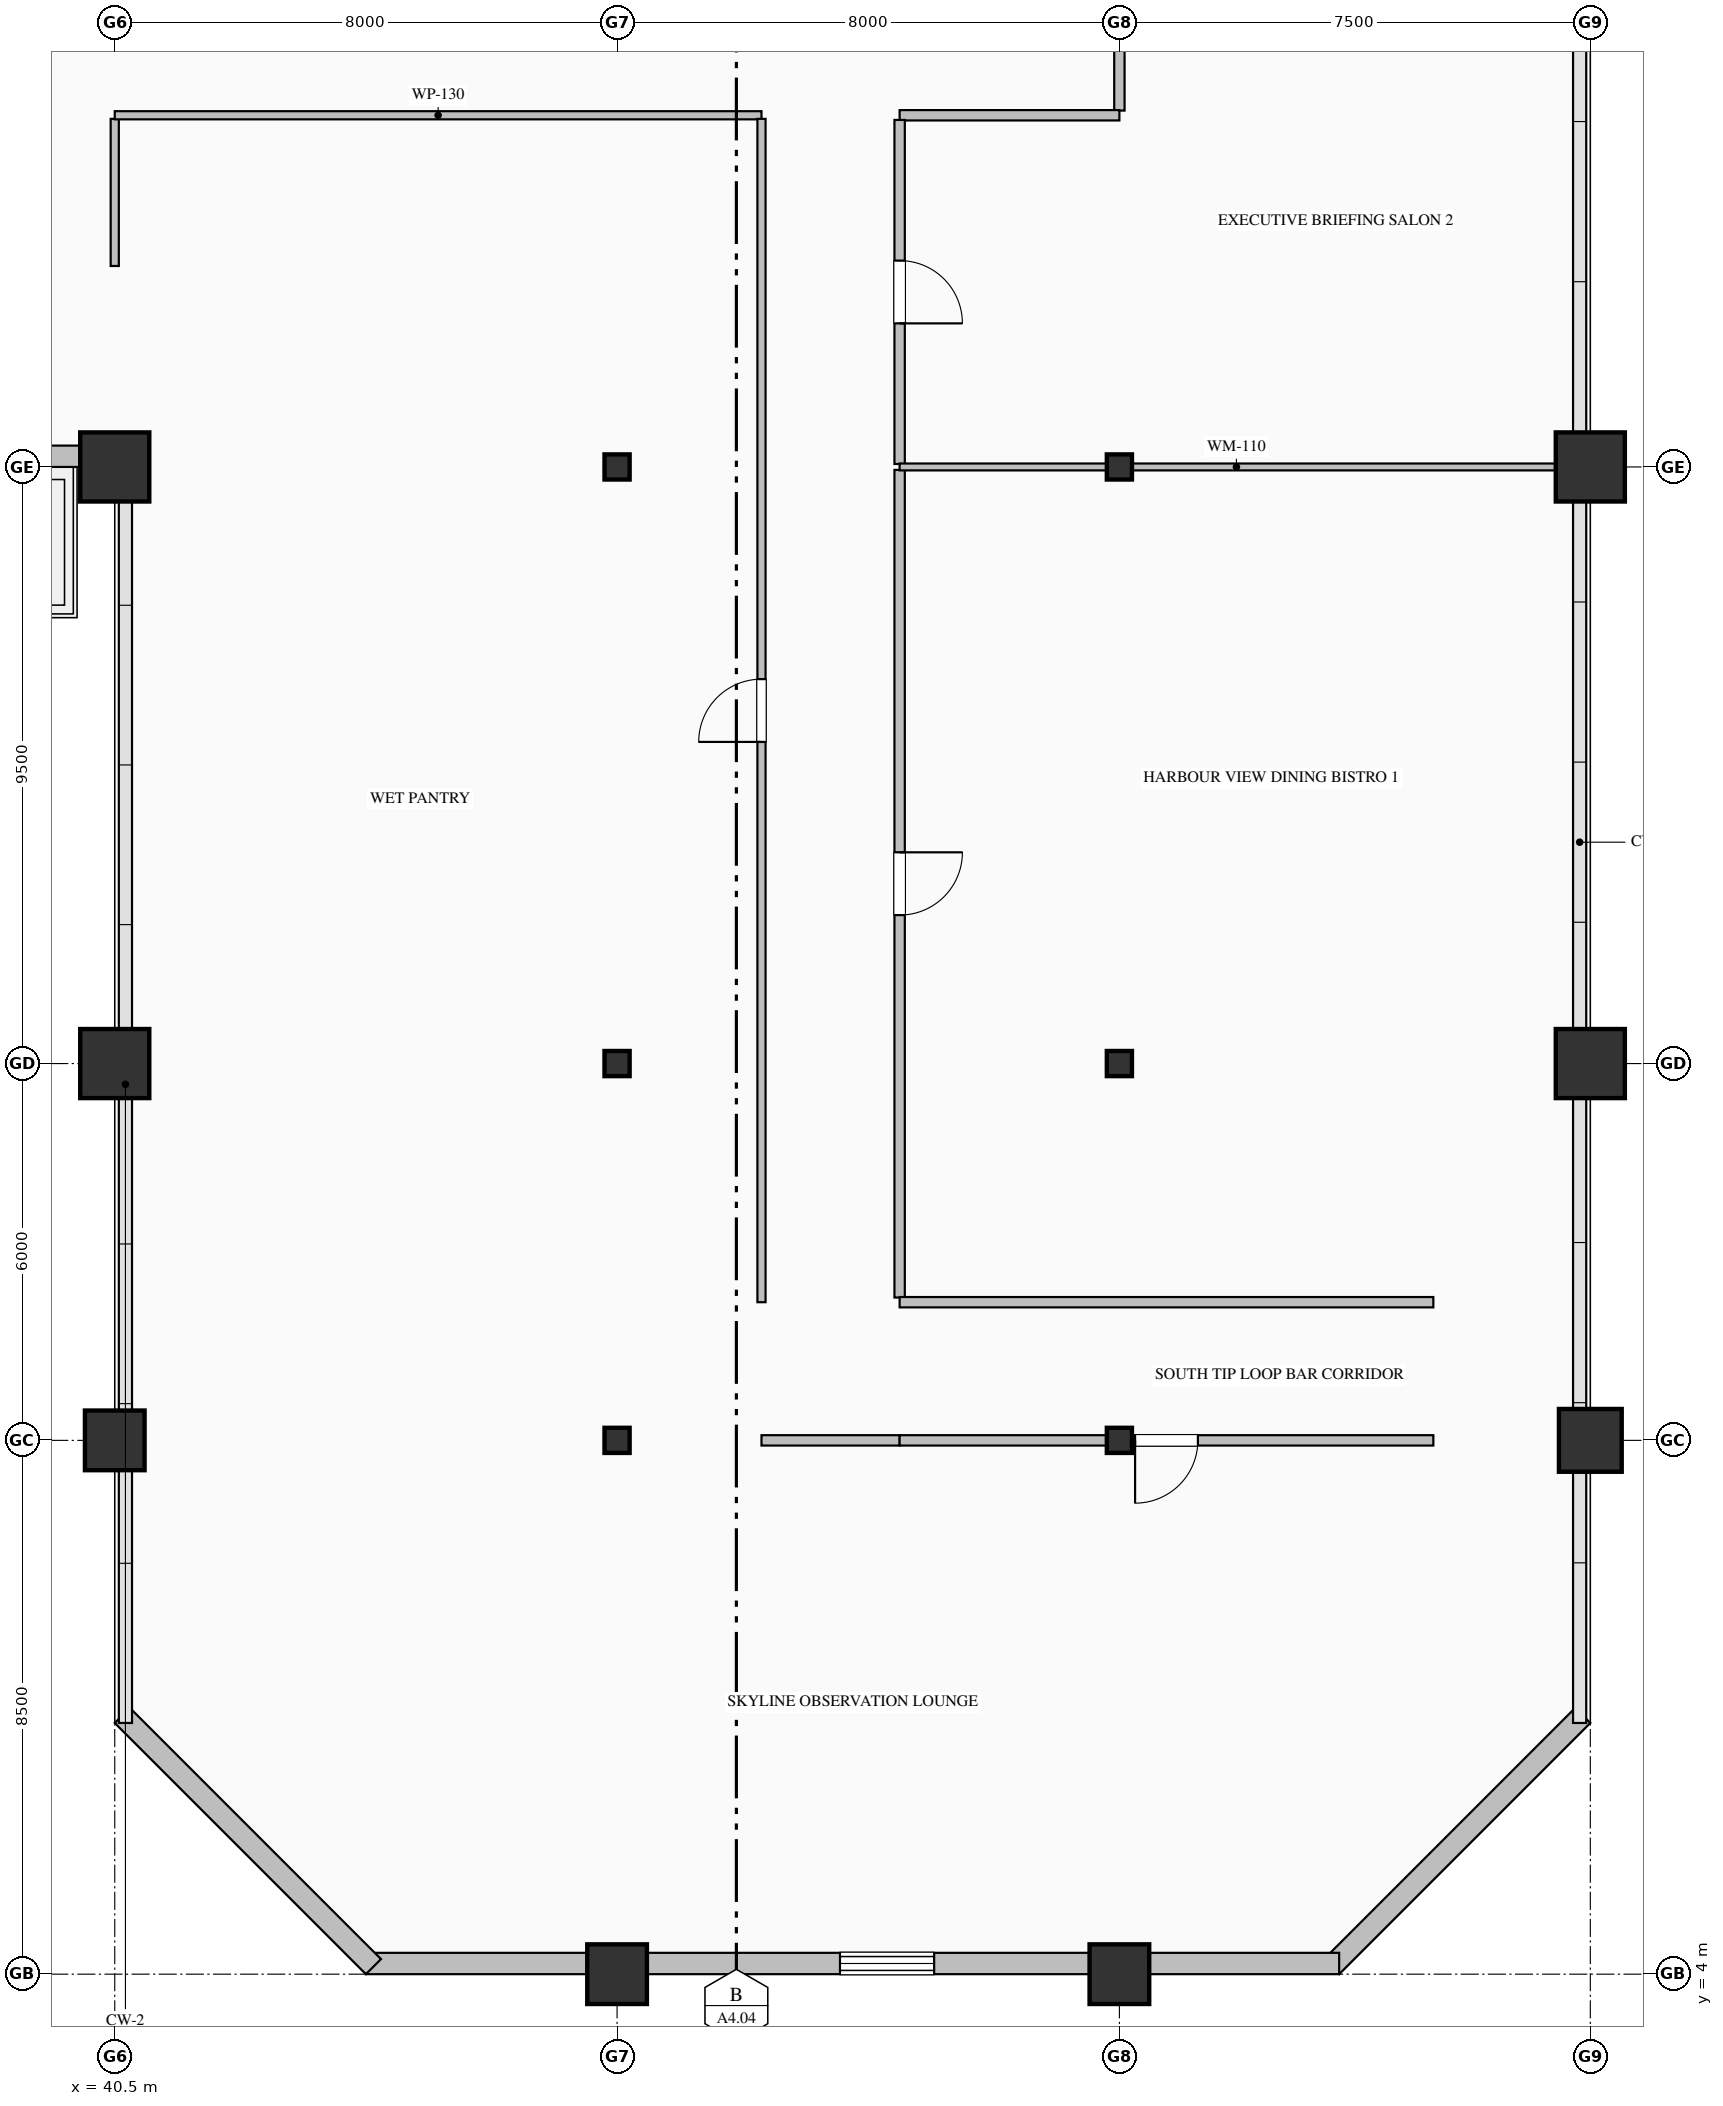
"""IFC4 building model, lengths in metres.
Left out: names, types, materials, properties, quantities, classifications, styles, units other than length and angle.
Written with IfcOpenShell. Run it as: python <this file> out.ifc"""

import sys

from ifc_helpers import new_model, si_unit, direction, frame, frame_2d, origin, origin_2d, place, context, subcontext, project, spatial, rectangle, hollow_rectangle, hollow_circle, i_section, extrude, element, fill, save


model = new_model("IFC4")
c1 = context("Model", 3, precision=1e-05, world=origin(), true_north=direction((0.0, 1.0)))
c2 = subcontext(c1, "Body", "Model", "MODEL_VIEW")
j1 = project(units=[si_unit("LENGTHUNIT", "METRE"), si_unit("PLANEANGLEUNIT", "RADIAN")], contexts=[c1])
p1 = place(None, origin())
s1 = spatial("IfcSite", under=j1, at=p1, CompositionType="ELEMENT")
p2 = place(p1, origin())
s2 = spatial("IfcBuilding", under=s1, at=p2, CompositionType="ELEMENT")
p3 = place(p2, frame((0.0, 0.0, 113.6)))
s3 = spatial("IfcBuildingStorey", under=s2, at=p3, CompositionType="ELEMENT", Elevation=113.6)
p4 = place(p3, frame((40.5, 12.5, 0.0), z_axis=(0.0, 0.0, 1.0), x_axis=(1.0, 0.0, 0.0)))
e1 = element("IfcColumn", 1, at=p4, inside=s3, PredefinedType="COLUMN", context=c2, shape_type="SweptSolid", body=[
    extrude(hollow_rectangle(XDim=0.95, YDim=0.95, WallThickness=0.036, at=origin_2d()), origin(), (0.0, 0.0, 1.0), 5.4),
])
for number, where, z_axis, x_axis in (
    (2, (40.5, 18.5, 0.0), (0.0, 0.0, 1.0), (1.0, 0.0, 0.0)),
    (3, (40.5, 28.0, 0.0), (0.0, 0.0, 1.0), (1.0, 0.0, 0.0)),
):
    element("IfcColumn", number, at=place(p3, frame(where, z_axis=z_axis, x_axis=x_axis)), inside=s3, PredefinedType="COLUMN", context=c2, shape_type="SweptSolid", body=[
        extrude(hollow_rectangle(XDim=1.1, YDim=1.1, WallThickness=0.04, at=origin_2d()), origin(), (0.0, 0.0, 1.0), 5.4),
    ])
p5 = place(p3, frame((48.5, 4.0, 0.0), z_axis=(0.0, 0.0, 1.0), x_axis=(1.0, 0.0, 0.0)))
e4 = element("IfcColumn", 4, at=p5, inside=s3, PredefinedType="COLUMN", context=c2, shape_type="SweptSolid", body=[
    extrude(hollow_rectangle(XDim=0.95, YDim=0.95, WallThickness=0.036, at=origin_2d()), origin(), (0.0, 0.0, 1.0), 5.4),
])
for number, where, z_axis, x_axis in (
    (5, (48.5, 12.5, 0.0), (0.0, 0.0, 1.0), (1.0, 0.0, 0.0)),
    (6, (48.5, 18.5, 0.0), (0.0, 0.0, 1.0), (1.0, 0.0, 0.0)),
    (7, (48.5, 28.0, 0.0), (0.0, 0.0, 1.0), (1.0, 0.0, 0.0)),
):
    element("IfcColumn", number, at=place(p3, frame(where, z_axis=z_axis, x_axis=x_axis)), inside=s3, PredefinedType="COLUMN", context=c2, shape_type="SweptSolid", body=[
        extrude(i_section(OverallWidth=0.4, OverallDepth=0.4, WebThickness=0.013, FlangeThickness=0.021, FilletRadius=0.022, at=origin_2d()), origin(), (0.0, 0.0, 1.0), 5.4),
    ])
p6 = place(p3, frame((56.5, 4.0, 0.0), z_axis=(0.0, 0.0, 1.0), x_axis=(1.0, 0.0, 0.0)))
e8 = element("IfcColumn", 8, at=p6, inside=s3, PredefinedType="COLUMN", context=c2, shape_type="SweptSolid", body=[
    extrude(hollow_rectangle(XDim=0.95, YDim=0.95, WallThickness=0.036, at=origin_2d()), origin(), (0.0, 0.0, 1.0), 5.4),
])
for number, where, z_axis, x_axis in (
    (9, (56.5, 12.5, 0.0), (0.0, 0.0, 1.0), (1.0, 0.0, 0.0)),
    (10, (56.5, 18.5, 0.0), (0.0, 0.0, 1.0), (1.0, 0.0, 0.0)),
    (11, (56.5, 28.0, 0.0), (0.0, 0.0, 1.0), (1.0, 0.0, 0.0)),
):
    element("IfcColumn", number, at=place(p3, frame(where, z_axis=z_axis, x_axis=x_axis)), inside=s3, PredefinedType="COLUMN", context=c2, shape_type="SweptSolid", body=[
        extrude(i_section(OverallWidth=0.4, OverallDepth=0.4, WebThickness=0.013, FlangeThickness=0.021, FilletRadius=0.022, at=origin_2d()), origin(), (0.0, 0.0, 1.0), 5.4),
    ])
p7 = place(p3, frame((64.0, 12.5, 0.0), z_axis=(0.0, 0.0, 1.0), x_axis=(1.0, 0.0, 0.0)))
e12 = element("IfcColumn", 12, at=p7, inside=s3, PredefinedType="COLUMN", context=c2, shape_type="SweptSolid", body=[
    extrude(hollow_circle(Radius=0.5, WallThickness=0.036, at=origin_2d()), origin(), (0.0, 0.0, 1.0), 5.4),
])
for number, where, z_axis, x_axis in (
    (13, (64.0, 18.5, 0.0), (0.0, 0.0, 1.0), (1.0, 0.0, 0.0)),
    (14, (64.0, 28.0, 0.0), (0.0, 0.0, 1.0), (1.0, 0.0, 0.0)),
):
    element("IfcColumn", number, at=place(p3, frame(where, z_axis=z_axis, x_axis=x_axis)), inside=s3, PredefinedType="COLUMN", context=c2, shape_type="SweptSolid", body=[
        extrude(hollow_rectangle(XDim=1.1, YDim=1.1, WallThickness=0.04, at=origin_2d()), origin(), (0.0, 0.0, 1.0), 5.4),
    ])
p8 = place(p3, frame((40.52, 28.17, 0.0), z_axis=(0.0, 0.0, 1.0), x_axis=(-1.0, 0.0, 0.0)))
e15 = element("IfcWall", 15, at=p8, inside=s3, PredefinedType="SOLIDWALL", context=c2, shape_type="SweptSolid", body=[
    extrude(rectangle(XDim=27.52, YDim=0.34, at=frame_2d((13.76, 0.0))), origin(), (0.0, 0.0, 1.0), 4.565),
])
p9 = place(p8, frame((17.1, 0.0, 0.65)))
e16 = element("IfcOpeningElement", 16, at=p9, cuts=e15, PredefinedType="OPENING", context=c2, shape_type="SweptSolid", body=[
    extrude(rectangle(XDim=1.8, YDim=2.55, at=frame_2d((0.9, 1.275))), frame((0.0, 0.18, 0.0), z_axis=(0.0, -1.0, 0.0), x_axis=(1.0, 0.0, 0.0)), (0.0, 0.0, 1.0), 0.36),
])
p10 = place(p8, frame((20.85, 0.0, 0.85)))
e17 = element("IfcOpeningElement", 17, at=p10, cuts=e15, PredefinedType="OPENING", context=c2, shape_type="SweptSolid", body=[
    extrude(rectangle(XDim=1.5, YDim=1.95, at=frame_2d((0.75, 0.975))), frame((0.0, 0.18, 0.0), z_axis=(0.0, -1.0, 0.0), x_axis=(1.0, 0.0, 0.0)), (0.0, 0.0, 1.0), 0.36),
])
p11 = place(p8, frame((11.395, 0.0, 0.0)))
e18 = element("IfcOpeningElement", 18, at=p11, cuts=e15, PredefinedType="OPENING", context=c2, shape_type="SweptSolid", body=[
    extrude(rectangle(XDim=1.25, YDim=2.25, at=frame_2d((0.625, 1.125))), frame((0.0, 0.18, 0.0), z_axis=(0.0, -1.0, 0.0), x_axis=(1.0, 0.0, 0.0)), (0.0, 0.0, 1.0), 0.36),
])
p12 = place(p3, frame((63.88, 8.12, 0.0), z_axis=(0.0, 0.0, 1.0), x_axis=(-0.707106781187, -0.707106781187, 0.0)))
e19 = element("IfcWall", 19, at=p12, inside=s3, PredefinedType="SOLIDWALL", context=c2, shape_type="SweptSolid", body=[
    extrude(rectangle(XDim=5.657, YDim=0.34, at=frame_2d((2.828, 0.0))), origin(), (0.0, 0.0, 1.0), 5.165),
])
p13 = place(p3, frame((60.0, 4.17, 0.0), z_axis=(0.0, 0.0, 1.0), x_axis=(-1.0, 0.0, 0.0)))
e20 = element("IfcWall", 20, at=p13, inside=s3, PredefinedType="SOLIDWALL", context=c2, shape_type="SweptSolid", body=[
    extrude(rectangle(XDim=15.5, YDim=0.34, at=frame_2d((7.75, 0.0))), origin(), (0.0, 0.0, 1.0), 4.665),
])
p14 = place(p13, frame((6.45, 0.0, 0.85)))
e21 = element("IfcOpeningElement", 21, at=p14, cuts=e20, PredefinedType="OPENING", context=c2, shape_type="SweptSolid", body=[
    extrude(rectangle(XDim=1.5, YDim=1.95, at=frame_2d((0.75, 0.975))), frame((0.0, 0.18, 0.0), z_axis=(0.0, -1.0, 0.0), x_axis=(1.0, 0.0, 0.0)), (0.0, 0.0, 1.0), 0.36),
])
p15 = place(p3, frame((44.62, 4.12, 0.0), z_axis=(0.0, 0.0, 1.0), x_axis=(-0.707106781187, 0.707106781187, 0.0)))
e22 = element("IfcWall", 22, at=p15, inside=s3, PredefinedType="SOLIDWALL", context=c2, shape_type="SweptSolid", body=[
    extrude(rectangle(XDim=5.657, YDim=0.34, at=frame_2d((2.828, 0.0))), origin(), (0.0, 0.0, 1.0), 5.165),
])
p16 = place(p3, frame((40.5, 33.543, 0.0), z_axis=(0.0, 0.0, 1.0), x_axis=(0.0, -1.0, 0.0)))
e23 = element("IfcWall", 23, at=p16, inside=s3, PredefinedType="PARTITIONING", context=c2, shape_type="SweptSolid", body=[
    extrude(rectangle(XDim=2.343, YDim=0.13, at=frame_2d((1.171, 0.0))), origin(), (0.0, 0.0, 1.0), 4.557),
])
p17 = place(p3, frame((56.5, 36.0, 0.0), z_axis=(0.0, 0.0, 1.0), x_axis=(0.0, -1.0, 0.0)))
e24 = element("IfcWall", 24, at=p17, inside=s3, PredefinedType="PARTITIONING", context=c2, shape_type="SweptSolid", body=[
    extrude(rectangle(XDim=2.325, YDim=0.165, at=frame_2d((1.163, 0.0))), origin(), (0.0, 0.0, 1.0), 4.557),
])
p18 = place(p3, frame((56.5, 33.6, 0.0), z_axis=(0.0, 0.0, 1.0), x_axis=(-1.0, 0.0, 0.0)))
e25 = element("IfcWall", 25, at=p18, inside=s3, PredefinedType="PARTITIONING", context=c2, shape_type="SweptSolid", body=[
    extrude(rectangle(XDim=3.5, YDim=0.165, at=frame_2d((1.75, 0.0))), origin(), (0.0, 0.0, 1.0), 5.165),
])
p19 = place(p3, frame((50.8, 33.6, 0.0), z_axis=(0.0, 0.0, 1.0), x_axis=(-1.0, 0.0, 0.0)))
e26 = element("IfcWall", 26, at=p19, inside=s3, PredefinedType="PARTITIONING", context=c2, shape_type="SweptSolid", body=[
    extrude(rectangle(XDim=10.3, YDim=0.13, at=frame_2d((5.15, 0.0))), origin(), (0.0, 0.0, 1.0), 5.165),
])
p20 = place(p3, frame((53.0, 27.953, 0.0), z_axis=(0.0, 0.0, 1.0), x_axis=(0.0, -1.0, 0.0)))
e27 = element("IfcWall", 27, at=p20, inside=s3, PredefinedType="PARTITIONING", context=c2, shape_type="SweptSolid", body=[
    extrude(rectangle(XDim=13.178, YDim=0.165, at=frame_2d((6.589, 0.0))), origin(), (0.0, 0.0, 1.0), 5.165),
])
p21 = place(p20, frame((6.089, 0.0, 0.0)))
e28 = element("IfcOpeningElement", 28, at=p21, cuts=e27, PredefinedType="OPENING", context=c2, shape_type="SweptSolid", body=[
    extrude(rectangle(XDim=1.0, YDim=2.15, at=frame_2d((0.5, 1.075))), frame((0.0, 0.093, 0.0), z_axis=(0.0, -1.0, 0.0), x_axis=(1.0, 0.0, 0.0)), (0.0, 0.0, 1.0), 0.185),
])
p22 = place(p3, frame((53.0, 33.525, 0.0), z_axis=(0.0, 0.0, 1.0), x_axis=(0.0, -1.0, 0.0)))
e29 = element("IfcWall", 29, at=p22, inside=s3, PredefinedType="PARTITIONING", context=c2, shape_type="SweptSolid", body=[
    extrude(rectangle(XDim=5.478, YDim=0.165, at=frame_2d((2.739, 0.0))), origin(), (0.0, 0.0, 1.0), 5.165),
])
p23 = place(p22, frame((2.239, 0.0, 0.0)))
e30 = element("IfcOpeningElement", 30, at=p23, cuts=e29, PredefinedType="OPENING", context=c2, shape_type="SweptSolid", body=[
    extrude(rectangle(XDim=1.0, YDim=2.15, at=frame_2d((0.5, 1.075))), frame((0.0, 0.093, 0.0), z_axis=(0.0, -1.0, 0.0), x_axis=(1.0, 0.0, 0.0)), (0.0, 0.0, 1.0), 0.185),
])
p24 = place(p3, frame((50.8, 14.7, 0.0), z_axis=(0.0, 0.0, 1.0), x_axis=(0.0, 1.0, 0.0)))
e31 = element("IfcWall", 31, at=p24, inside=s3, PredefinedType="PARTITIONING", context=c2, shape_type="SweptSolid", body=[
    extrude(rectangle(XDim=18.843, YDim=0.13, at=frame_2d((9.421, 0.0))), origin(), (0.0, 0.0, 1.0), 5.165),
])
p25 = place(p24, frame((8.921, 0.0, 0.0)))
e32 = element("IfcOpeningElement", 32, at=p25, cuts=e31, PredefinedType="OPENING", context=c2, shape_type="SweptSolid", body=[
    extrude(rectangle(XDim=1.0, YDim=2.15, at=frame_2d((0.5, 1.075))), frame((0.0, 0.075, 0.0), z_axis=(0.0, -1.0, 0.0), x_axis=(1.0, 0.0, 0.0)), (0.0, 0.0, 1.0), 0.15),
])
p26 = place(p3, frame((53.0, 12.5, 0.0), z_axis=(0.0, 0.0, 1.0), x_axis=(-1.0, 0.0, 0.0)))
e33 = element("IfcWall", 33, at=p26, inside=s3, PredefinedType="PARTITIONING", context=c2, shape_type="SweptSolid", body=[
    extrude(rectangle(XDim=2.2, YDim=0.165, at=frame_2d((1.1, 0.0))), origin(), (0.0, 0.0, 1.0), 4.557),
])
p27 = place(p3, frame((53.0, 14.7, 0.0), z_axis=(0.0, 0.0, 1.0), x_axis=(1.0, 0.0, 0.0)))
e34 = element("IfcWall", 34, at=p27, inside=s3, PredefinedType="PARTITIONING", context=c2, shape_type="SweptSolid", body=[
    extrude(rectangle(XDim=8.5, YDim=0.165, at=frame_2d((4.25, 0.0))), origin(), (0.0, 0.0, 1.0), 5.165),
])
p28 = place(p3, frame((61.5, 12.5, 0.0), z_axis=(0.0, 0.0, 1.0), x_axis=(-1.0, 0.0, 0.0)))
e35 = element("IfcWall", 35, at=p28, inside=s3, PredefinedType="PARTITIONING", context=c2, shape_type="SweptSolid", body=[
    extrude(rectangle(XDim=8.5, YDim=0.165, at=frame_2d((4.25, 0.0))), origin(), (0.0, 0.0, 1.0), 4.557),
])
p29 = place(p28, frame((3.75, 0.0, 0.0)))
e36 = element("IfcOpeningElement", 36, at=p29, cuts=e35, PredefinedType="OPENING", context=c2, shape_type="SweptSolid", body=[
    extrude(rectangle(XDim=1.0, YDim=2.15, at=frame_2d((0.5, 1.075))), frame((0.0, 0.093, 0.0), z_axis=(0.0, -1.0, 0.0), x_axis=(1.0, 0.0, 0.0)), (0.0, 0.0, 1.0), 0.185),
])
p30 = place(p3, frame((53.0, 28.0, 0.0), z_axis=(0.0, 0.0, 1.0), x_axis=(1.0, 0.0, 0.0)))
e37 = element("IfcWall", 37, at=p30, inside=s3, PredefinedType="MOVABLE", context=c2, shape_type="SweptSolid", body=[
    extrude(rectangle(XDim=10.728, YDim=0.11, at=frame_2d((5.364, 0.0))), origin(), (0.0, 0.0, 1.0), 4.557),
])
p31 = place(p14, origin())
e38 = element("IfcWindow", 38, at=p31, inside=s3, PartitioningType="DOUBLE_PANEL_VERTICAL", PredefinedType="WINDOW", context=c2, shape_type="SweptSolid", body=[
    extrude(rectangle(XDim=1.5, YDim=1.95, at=frame_2d((0.75, 0.975))), frame((0.0, 0.15, 0.0), z_axis=(0.0, -1.0, 0.0), x_axis=(1.0, 0.0, 0.0)), (0.0, 0.0, 1.0), 0.06),
])
fill(e21, e38)
p32 = place(p21, origin())
e39 = element("IfcDoor", 39, at=p32, inside=s3, OperationType="SINGLE_SWING_LEFT", PredefinedType="DOOR", context=c2, shape_type="SweptSolid", body=[
    extrude(rectangle(XDim=1.0, YDim=2.15, at=frame_2d((0.5, 1.075))), frame((0.0, 0.025, 0.0), z_axis=(0.0, -1.0, 0.0), x_axis=(1.0, 0.0, 0.0)), (0.0, 0.0, 1.0), 0.05),
])
fill(e28, e39)
p33 = place(p23, origin())
e40 = element("IfcDoor", 40, at=p33, inside=s3, OperationType="SINGLE_SWING_RIGHT", PredefinedType="DOOR", context=c2, shape_type="SweptSolid", body=[
    extrude(rectangle(XDim=1.0, YDim=2.15, at=frame_2d((0.5, 1.075))), frame((0.0, 0.025, 0.0), z_axis=(0.0, -1.0, 0.0), x_axis=(1.0, 0.0, 0.0)), (0.0, 0.0, 1.0), 0.05),
])
fill(e30, e40)
p34 = place(p25, origin())
e41 = element("IfcDoor", 41, at=p34, inside=s3, OperationType="SINGLE_SWING_LEFT", PredefinedType="DOOR", context=c2, shape_type="SweptSolid", body=[
    extrude(rectangle(XDim=1.0, YDim=2.15, at=frame_2d((0.5, 1.075))), frame((0.0, 0.025, 0.0), z_axis=(0.0, -1.0, 0.0), x_axis=(1.0, 0.0, 0.0)), (0.0, 0.0, 1.0), 0.05),
])
fill(e32, e41)
p35 = place(p29, origin())
e42 = element("IfcDoor", 42, at=p35, inside=s3, OperationType="SINGLE_SWING_RIGHT", PredefinedType="DOOR", context=c2, shape_type="SweptSolid", body=[
    extrude(rectangle(XDim=1.0, YDim=2.15, at=frame_2d((0.5, 1.075))), frame((0.0, 0.025, 0.0), z_axis=(0.0, -1.0, 0.0), x_axis=(1.0, 0.0, 0.0)), (0.0, 0.0, 1.0), 0.05),
])
fill(e36, e42)
save(model, sys.argv[1])
